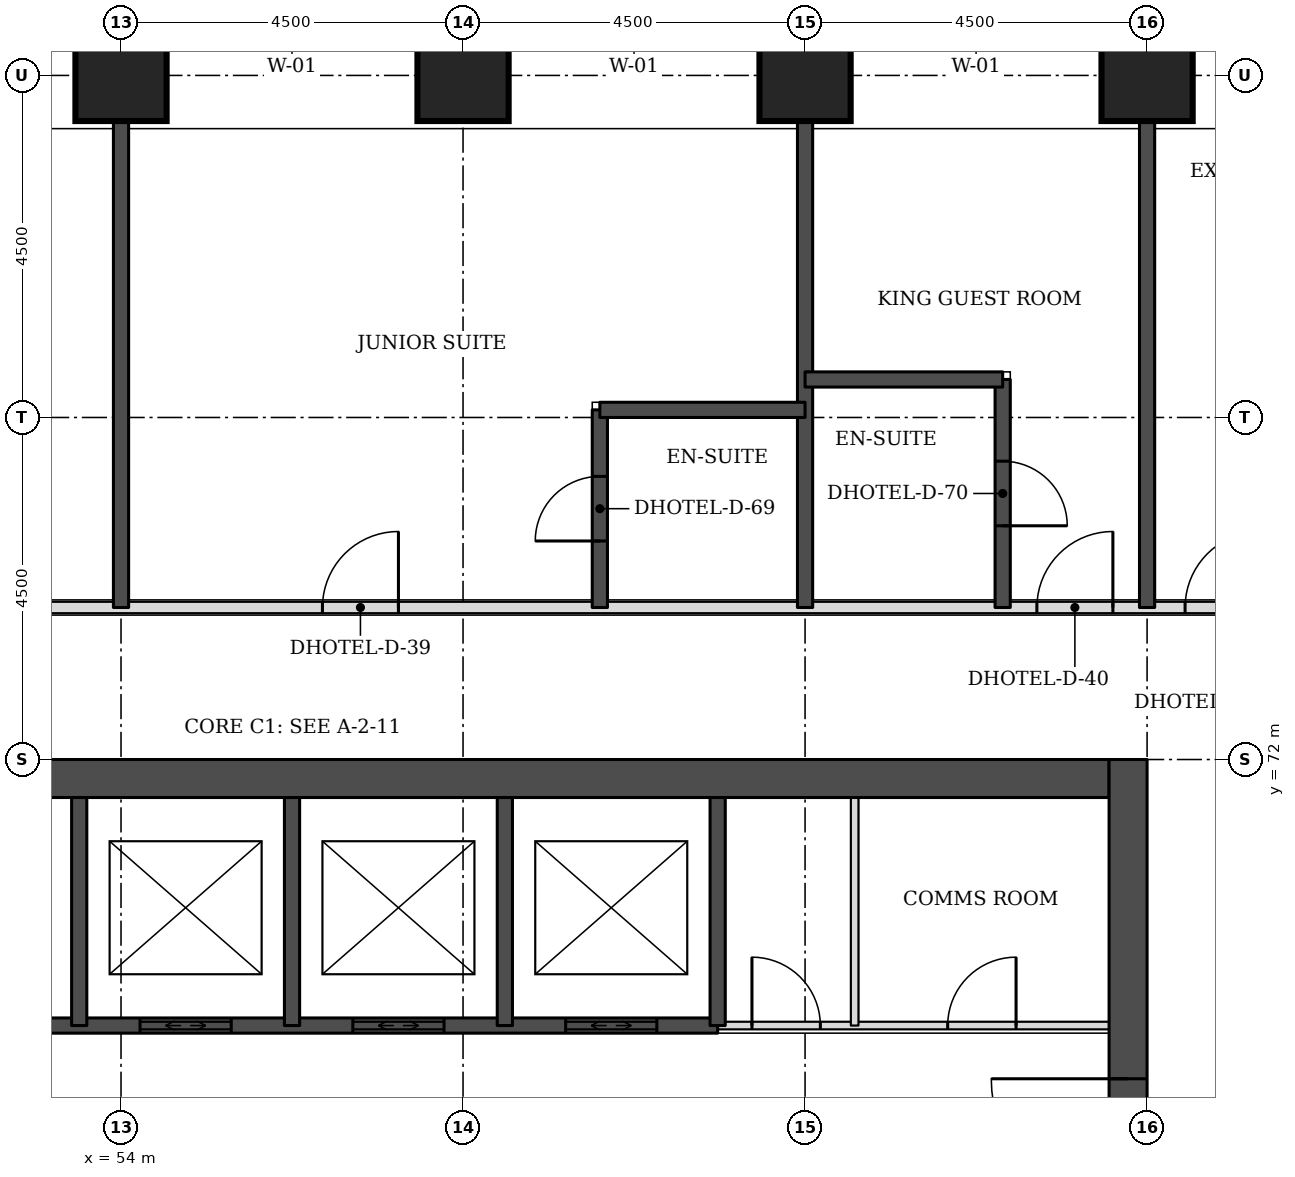
"""IFC4 building model, lengths in metres.
Left out: names, types, materials, properties, quantities, classifications, styles, units other than length and angle.
Written with IfcOpenShell. Run it as: python <this file> out.ifc"""

import sys

from ifc_helpers import new_model, si_unit, direction, frame, frame_2d, origin, origin_2d, place, context, subcontext, project, spatial, rectangle, extrude, element, fill, save


model = new_model("IFC4")
c1 = context("Model", 3, precision=1e-05, world=origin(), true_north=direction((0.0, 1.0)))
c2 = subcontext(c1, "Body", "Model", "MODEL_VIEW")
j1 = project(units=[si_unit("LENGTHUNIT", "METRE"), si_unit("PLANEANGLEUNIT", "RADIAN")], contexts=[c1])
p1 = place(None, origin())
s1 = spatial("IfcSite", under=j1, at=p1, CompositionType="ELEMENT")
p2 = place(p1, origin())
s2 = spatial("IfcBuilding", under=s1, at=p2, CompositionType="ELEMENT")
p3 = place(p2, frame((0.0, 0.0, 36.3)))
s3 = spatial("IfcBuildingStorey", under=s2, at=p3, CompositionType="ELEMENT", Elevation=36.3)
for number, where, z_axis, x_axis in (
    (1, (54.0, 81.0, 0.0), (0.0, 0.0, 1.0), (1.0, 0.0, 0.0)),
    (2, (58.5, 81.0, 0.0), (0.0, 0.0, 1.0), (1.0, 0.0, 0.0)),
    (3, (63.0, 81.0, 0.0), (0.0, 0.0, 1.0), (1.0, 0.0, 0.0)),
    (4, (67.5, 81.0, 0.0), (0.0, 0.0, 1.0), (1.0, 0.0, 0.0)),
):
    element("IfcColumn", number, at=place(p3, frame(where, z_axis=z_axis, x_axis=x_axis)), inside=s3, PredefinedType="COLUMN", context=c2, shape_type="SweptSolid", body=[
        extrude(rectangle(XDim=1.2, YDim=1.2, at=origin_2d()), origin(), (0.0, 0.0, 1.0), 3.3),
    ])
p4 = place(p3, frame((45.5, 71.75, 0.0), z_axis=(0.0, 0.0, 1.0), x_axis=(1.0, 0.0, 0.0)))
e5 = element("IfcWall", 5, at=p4, inside=s3, PredefinedType="SHEAR", context=c2, shape_type="SweptSolid", body=[
    extrude(rectangle(XDim=21.5, YDim=0.5, at=frame_2d((10.75, 0.0))), origin(), (0.0, 0.0, 1.0), 3.3),
])
p5 = place(p3, frame((67.25, 49.5, 0.0), z_axis=(0.0, 0.0, 1.0), x_axis=(0.0, 1.0, 0.0)))
e6 = element("IfcWall", 6, at=p5, inside=s3, PredefinedType="SHEAR", context=c2, shape_type="SweptSolid", body=[
    extrude(rectangle(XDim=22.5, YDim=0.5, at=frame_2d((11.25, 0.0))), origin(), (0.0, 0.0, 1.0), 3.3),
])
p6 = place(p5, frame((4.2, 0.0, 0.0)))
e7 = element("IfcOpeningElement", 7, at=p6, cuts=e6, PredefinedType="OPENING", context=c2, shape_type="SweptSolid", body=[
    extrude(rectangle(XDim=1.8, YDim=2.1, at=frame_2d((0.9, 1.05))), frame((0.0, 0.26, 0.0), z_axis=(0.0, -1.0, 0.0), x_axis=(1.0, 0.0, 0.0)), (0.0, 0.0, 1.0), 0.52),
])
p7 = place(p5, frame((6.9, 0.0, 0.0)))
e8 = element("IfcOpeningElement", 8, at=p7, cuts=e6, PredefinedType="OPENING", context=c2, shape_type="SweptSolid", body=[
    extrude(rectangle(XDim=1.1, YDim=2.1, at=frame_2d((0.55, 1.05))), frame((0.0, 0.26, 0.0), z_axis=(0.0, -1.0, 0.0), x_axis=(1.0, 0.0, 0.0)), (0.0, 0.0, 1.0), 0.52),
])
p8 = place(p5, frame((13.6, 0.0, 0.0)))
e9 = element("IfcOpeningElement", 9, at=p8, cuts=e6, PredefinedType="OPENING", context=c2, shape_type="SweptSolid", body=[
    extrude(rectangle(XDim=1.1, YDim=2.1, at=frame_2d((0.55, 1.05))), frame((0.0, 0.26, 0.0), z_axis=(0.0, -1.0, 0.0), x_axis=(1.0, 0.0, 0.0)), (0.0, 0.0, 1.0), 0.52),
])
p9 = place(p5, frame((16.5, 0.0, 0.0)))
e10 = element("IfcOpeningElement", 10, at=p9, cuts=e6, PredefinedType="OPENING", context=c2, shape_type="SweptSolid", body=[
    extrude(rectangle(XDim=1.8, YDim=2.1, at=frame_2d((0.9, 1.05))), frame((0.0, 0.26, 0.0), z_axis=(0.0, -1.0, 0.0), x_axis=(1.0, 0.0, 0.0)), (0.0, 0.0, 1.0), 0.52),
])
p10 = place(p3, frame((43.0, 74.0, 0.0), z_axis=(0.0, 0.0, 1.0), x_axis=(1.0, 0.0, 0.0)))
e11 = element("IfcWall", 11, at=p10, inside=s3, PredefinedType="PARTITIONING", context=c2, shape_type="SweptSolid", body=[
    extrude(rectangle(XDim=26.5, YDim=0.15, at=frame_2d((13.25, 0.0))), origin(), (0.0, 0.0, 1.0), 3.08),
])
p11 = place(p10, frame((7.6, 0.0, 0.0)))
e12 = element("IfcOpeningElement", 12, at=p11, cuts=e11, PredefinedType="OPENING", context=c2, shape_type="SweptSolid", body=[
    extrude(rectangle(XDim=1.0, YDim=2.1, at=frame_2d((0.5, 1.05))), frame((0.0, 0.085, 0.0), z_axis=(0.0, -1.0, 0.0), x_axis=(1.0, 0.0, 0.0)), (0.0, 0.0, 1.0), 0.17),
])
p12 = place(p10, frame((13.65, 0.0, 0.0)))
e13 = element("IfcOpeningElement", 13, at=p12, cuts=e11, PredefinedType="OPENING", context=c2, shape_type="SweptSolid", body=[
    extrude(rectangle(XDim=1.0, YDim=2.1, at=frame_2d((0.5, 1.05))), frame((0.0, 0.085, 0.0), z_axis=(0.0, -1.0, 0.0), x_axis=(1.0, 0.0, 0.0)), (0.0, 0.0, 1.0), 0.17),
])
p13 = place(p10, frame((23.05, 0.0, 0.0)))
e14 = element("IfcOpeningElement", 14, at=p13, cuts=e11, PredefinedType="OPENING", context=c2, shape_type="SweptSolid", body=[
    extrude(rectangle(XDim=1.0, YDim=2.1, at=frame_2d((0.5, 1.05))), frame((0.0, 0.085, 0.0), z_axis=(0.0, -1.0, 0.0), x_axis=(1.0, 0.0, 0.0)), (0.0, 0.0, 1.0), 0.17),
])
p14 = place(p10, frame((0.5, 0.0, 0.0)))
e15 = element("IfcOpeningElement", 15, at=p14, cuts=e11, PredefinedType="OPENING", context=c2, shape_type="SweptSolid", body=[
    extrude(rectangle(XDim=1.0, YDim=2.1, at=frame_2d((0.5, 1.05))), frame((0.0, 0.085, 0.0), z_axis=(0.0, -1.0, 0.0), x_axis=(1.0, 0.0, 0.0)), (0.0, 0.0, 1.0), 0.17),
])
p15 = place(p10, frame((25.0, 0.0, 0.0)))
e16 = element("IfcOpeningElement", 16, at=p15, cuts=e11, PredefinedType="OPENING", context=c2, shape_type="SweptSolid", body=[
    extrude(rectangle(XDim=1.0, YDim=2.1, at=frame_2d((0.5, 1.05))), frame((0.0, 0.085, 0.0), z_axis=(0.0, -1.0, 0.0), x_axis=(1.0, 0.0, 0.0)), (0.0, 0.0, 1.0), 0.17),
])
p16 = place(p3, frame((54.0, 74.0, 0.0), z_axis=(0.0, 0.0, 1.0), x_axis=(0.0, 1.0, 0.0)))
e17 = element("IfcWall", 17, at=p16, inside=s3, PredefinedType="SOLIDWALL", context=c2, shape_type="SweptSolid", body=[
    extrude(rectangle(XDim=6.4, YDim=0.2, at=frame_2d((3.2, 0.0))), origin(), (0.0, 0.0, 1.0), 3.08),
])
p17 = place(p3, frame((60.3, 74.0, 0.0), z_axis=(0.0, 0.0, 1.0), x_axis=(0.0, 1.0, 0.0)))
e18 = element("IfcWall", 18, at=p17, inside=s3, PredefinedType="SOLIDWALL", context=c2, shape_type="SweptSolid", body=[
    extrude(rectangle(XDim=2.6, YDim=0.2, at=frame_2d((1.3, 0.0))), origin(), (0.0, 0.0, 1.0), 3.08),
])
p18 = place(p17, frame((0.875, 0.0, 0.0)))
e19 = element("IfcOpeningElement", 19, at=p18, cuts=e18, PredefinedType="OPENING", context=c2, shape_type="SweptSolid", body=[
    extrude(rectangle(XDim=0.85, YDim=2.1, at=frame_2d((0.425, 1.05))), frame((0.0, 0.11, 0.0), z_axis=(0.0, -1.0, 0.0), x_axis=(1.0, 0.0, 0.0)), (0.0, 0.0, 1.0), 0.22),
])
p19 = place(p3, frame((63.0, 74.0, 0.0), z_axis=(0.0, 0.0, 1.0), x_axis=(0.0, 1.0, 0.0)))
e20 = element("IfcWall", 20, at=p19, inside=s3, PredefinedType="SOLIDWALL", context=c2, shape_type="SweptSolid", body=[
    extrude(rectangle(XDim=6.4, YDim=0.2, at=frame_2d((3.2, 0.0))), origin(), (0.0, 0.0, 1.0), 3.08),
])
p20 = place(p3, frame((65.6, 74.0, 0.0), z_axis=(0.0, 0.0, 1.0), x_axis=(0.0, 1.0, 0.0)))
e21 = element("IfcWall", 21, at=p20, inside=s3, PredefinedType="SOLIDWALL", context=c2, shape_type="SweptSolid", body=[
    extrude(rectangle(XDim=3.0, YDim=0.2, at=frame_2d((1.5, 0.0))), origin(), (0.0, 0.0, 1.0), 3.08),
])
p21 = place(p20, frame((1.075, 0.0, 0.0)))
e22 = element("IfcOpeningElement", 22, at=p21, cuts=e21, PredefinedType="OPENING", context=c2, shape_type="SweptSolid", body=[
    extrude(rectangle(XDim=0.85, YDim=2.1, at=frame_2d((0.425, 1.05))), frame((0.0, 0.11, 0.0), z_axis=(0.0, -1.0, 0.0), x_axis=(1.0, 0.0, 0.0)), (0.0, 0.0, 1.0), 0.22),
])
p22 = place(p3, frame((67.5, 74.0, 0.0), z_axis=(0.0, 0.0, 1.0), x_axis=(0.0, 1.0, 0.0)))
e23 = element("IfcWall", 23, at=p22, inside=s3, PredefinedType="SOLIDWALL", context=c2, shape_type="SweptSolid", body=[
    extrude(rectangle(XDim=6.4, YDim=0.2, at=frame_2d((3.2, 0.0))), origin(), (0.0, 0.0, 1.0), 3.08),
])
p23 = place(p3, frame((60.3, 76.6, 0.0), z_axis=(0.0, 0.0, 1.0), x_axis=(1.0, 0.0, 0.0)))
e24 = element("IfcWall", 24, at=p23, inside=s3, PredefinedType="SOLIDWALL", context=c2, shape_type="SweptSolid", body=[
    extrude(rectangle(XDim=2.7, YDim=0.2, at=frame_2d((1.35, 0.0))), origin(), (0.0, 0.0, 1.0), 3.08),
])
p24 = place(p3, frame((63.0, 77.0, 0.0), z_axis=(0.0, 0.0, 1.0), x_axis=(1.0, 0.0, 0.0)))
e25 = element("IfcWall", 25, at=p24, inside=s3, PredefinedType="SOLIDWALL", context=c2, shape_type="SweptSolid", body=[
    extrude(rectangle(XDim=2.6, YDim=0.2, at=frame_2d((1.3, 0.0))), origin(), (0.0, 0.0, 1.0), 3.08),
])
p25 = place(p3, frame((61.85, 68.5, 0.0), z_axis=(0.0, 0.0, 1.0), x_axis=(1.0, 0.0, 0.0)))
e26 = element("IfcWall", 26, at=p25, inside=s3, PredefinedType="PARTITIONING", context=c2, shape_type="SweptSolid", body=[
    extrude(rectangle(XDim=5.15, YDim=0.1, at=frame_2d((2.575, 0.0))), origin(), (0.0, 0.0, 1.0), 3.08),
])
p26 = place(p25, frame((3.026, 0.0, 0.0)))
e27 = element("IfcOpeningElement", 27, at=p26, cuts=e26, PredefinedType="OPENING", context=c2, shape_type="SweptSolid", body=[
    extrude(rectangle(XDim=0.9, YDim=2.1, at=frame_2d((0.45, 1.05))), frame((0.0, 0.06, 0.0), z_axis=(0.0, -1.0, 0.0), x_axis=(1.0, 0.0, 0.0)), (0.0, 0.0, 1.0), 0.12),
])
p27 = place(p25, frame((0.451, 0.0, 0.0)))
e28 = element("IfcOpeningElement", 28, at=p27, cuts=e26, PredefinedType="OPENING", context=c2, shape_type="SweptSolid", body=[
    extrude(rectangle(XDim=0.9, YDim=2.1, at=frame_2d((0.45, 1.05))), frame((0.0, 0.06, 0.0), z_axis=(0.0, -1.0, 0.0), x_axis=(1.0, 0.0, 0.0)), (0.0, 0.0, 1.0), 0.12),
])
p28 = place(p3, frame((50.65, 68.5, 0.0), z_axis=(0.0, 0.0, 1.0), x_axis=(1.0, 0.0, 0.0)))
e29 = element("IfcWall", 29, at=p28, inside=s3, PredefinedType="SOLIDWALL", context=c2, shape_type="SweptSolid", body=[
    extrude(rectangle(XDim=11.2, YDim=0.2, at=frame_2d((5.6, 0.0))), origin(), (0.0, 0.0, 1.0), 3.08),
])
p29 = place(p28, frame((0.8, 0.0, 0.0)))
e30 = element("IfcOpeningElement", 30, at=p29, cuts=e29, PredefinedType="OPENING", context=c2, shape_type="SweptSolid", body=[
    extrude(rectangle(XDim=1.2, YDim=2.1, at=frame_2d((0.6, 1.05))), frame((0.0, 0.11, 0.0), z_axis=(0.0, -1.0, 0.0), x_axis=(1.0, 0.0, 0.0)), (0.0, 0.0, 1.0), 0.22),
])
p30 = place(p28, frame((3.6, 0.0, 0.0)))
e31 = element("IfcOpeningElement", 31, at=p30, cuts=e29, PredefinedType="OPENING", context=c2, shape_type="SweptSolid", body=[
    extrude(rectangle(XDim=1.2, YDim=2.1, at=frame_2d((0.6, 1.05))), frame((0.0, 0.11, 0.0), z_axis=(0.0, -1.0, 0.0), x_axis=(1.0, 0.0, 0.0)), (0.0, 0.0, 1.0), 0.22),
])
p31 = place(p28, frame((6.4, 0.0, 0.0)))
e32 = element("IfcOpeningElement", 32, at=p31, cuts=e29, PredefinedType="OPENING", context=c2, shape_type="SweptSolid", body=[
    extrude(rectangle(XDim=1.2, YDim=2.1, at=frame_2d((0.6, 1.05))), frame((0.0, 0.11, 0.0), z_axis=(0.0, -1.0, 0.0), x_axis=(1.0, 0.0, 0.0)), (0.0, 0.0, 1.0), 0.22),
])
p32 = place(p28, frame((9.2, 0.0, 0.0)))
e33 = element("IfcOpeningElement", 33, at=p32, cuts=e29, PredefinedType="OPENING", context=c2, shape_type="SweptSolid", body=[
    extrude(rectangle(XDim=1.2, YDim=2.1, at=frame_2d((0.6, 1.05))), frame((0.0, 0.11, 0.0), z_axis=(0.0, -1.0, 0.0), x_axis=(1.0, 0.0, 0.0)), (0.0, 0.0, 1.0), 0.22),
])
for number, where, z_axis, x_axis in (
    (34, (53.45, 68.5, 0.0), (0.0, 0.0, 1.0), (0.0, 1.0, 0.0)),
    (35, (56.25, 68.5, 0.0), (0.0, 0.0, 1.0), (0.0, 1.0, 0.0)),
    (36, (59.05, 68.5, 0.0), (0.0, 0.0, 1.0), (0.0, 1.0, 0.0)),
    (37, (61.85, 68.5, 0.0), (0.0, 0.0, 1.0), (0.0, 1.0, 0.0)),
):
    element("IfcWall", number, at=place(p3, frame(where, z_axis=z_axis, x_axis=x_axis)), inside=s3, PredefinedType="SOLIDWALL", context=c2, shape_type="SweptSolid", body=[
        extrude(rectangle(XDim=3.0, YDim=0.2, at=frame_2d((1.5, 0.0))), origin(), (0.0, 0.0, 1.0), 3.08),
    ])
p33 = place(p3, frame((63.653, 68.5, 0.0), z_axis=(0.0, 0.0, 1.0), x_axis=(0.0, 1.0, 0.0)))
e38 = element("IfcWall", 38, at=p33, inside=s3, PredefinedType="PARTITIONING", context=c2, shape_type="SweptSolid", body=[
    extrude(rectangle(XDim=3.0, YDim=0.1, at=frame_2d((1.5, 0.0))), origin(), (0.0, 0.0, 1.0), 3.08),
])
p34 = place(p12, origin())
e39 = element("IfcDoor", 39, at=p34, inside=s3, OperationType="SINGLE_SWING_RIGHT", PredefinedType="DOOR", context=c2, shape_type="SweptSolid", body=[
    extrude(rectangle(XDim=1.0, YDim=2.1, at=frame_2d((0.5, 1.05))), frame((0.0, 0.025, 0.0), z_axis=(0.0, -1.0, 0.0), x_axis=(1.0, 0.0, 0.0)), (0.0, 0.0, 1.0), 0.05),
])
fill(e13, e39)
p35 = place(p18, origin())
e40 = element("IfcDoor", 40, at=p35, inside=s3, OperationType="SINGLE_SWING_LEFT", PredefinedType="DOOR", context=c2, shape_type="SweptSolid", body=[
    extrude(rectangle(XDim=0.85, YDim=2.1, at=frame_2d((0.425, 1.05))), frame((0.0, 0.025, 0.0), z_axis=(0.0, -1.0, 0.0), x_axis=(1.0, 0.0, 0.0)), (0.0, 0.0, 1.0), 0.05),
])
fill(e19, e40)
p36 = place(p13, origin())
e41 = element("IfcDoor", 41, at=p36, inside=s3, OperationType="SINGLE_SWING_RIGHT", PredefinedType="DOOR", context=c2, shape_type="SweptSolid", body=[
    extrude(rectangle(XDim=1.0, YDim=2.1, at=frame_2d((0.5, 1.05))), frame((0.0, 0.025, 0.0), z_axis=(0.0, -1.0, 0.0), x_axis=(1.0, 0.0, 0.0)), (0.0, 0.0, 1.0), 0.05),
])
fill(e14, e41)
p37 = place(p21, frame((0.85, 0.0, 0.0), z_axis=(0.0, 0.0, 1.0), x_axis=(-1.0, 0.0, 0.0)))
e42 = element("IfcDoor", 42, at=p37, inside=s3, OperationType="SINGLE_SWING_RIGHT", PredefinedType="DOOR", context=c2, shape_type="SweptSolid", body=[
    extrude(rectangle(XDim=0.85, YDim=2.1, at=frame_2d((0.425, 1.05))), frame((0.0, 0.025, 0.0), z_axis=(0.0, -1.0, 0.0), x_axis=(1.0, 0.0, 0.0)), (0.0, 0.0, 1.0), 0.05),
])
fill(e22, e42)
p38 = place(p15, origin())
e43 = element("IfcDoor", 43, at=p38, inside=s3, OperationType="SINGLE_SWING_RIGHT", PredefinedType="DOOR", context=c2, shape_type="SweptSolid", body=[
    extrude(rectangle(XDim=1.0, YDim=2.1, at=frame_2d((0.5, 1.05))), frame((0.0, 0.025, 0.0), z_axis=(0.0, -1.0, 0.0), x_axis=(1.0, 0.0, 0.0)), (0.0, 0.0, 1.0), 0.05),
])
fill(e16, e43)
p39 = place(p30, origin())
e44 = element("IfcDoor", 44, at=p39, inside=s3, OperationType="DOUBLE_DOOR_SLIDING", PredefinedType="DOOR", context=c2, shape_type="SweptSolid", body=[
    extrude(rectangle(XDim=1.2, YDim=2.1, at=frame_2d((0.6, 1.05))), frame((0.0, 0.025, 0.0), z_axis=(0.0, -1.0, 0.0), x_axis=(1.0, 0.0, 0.0)), (0.0, 0.0, 1.0), 0.05),
])
fill(e31, e44)
p40 = place(p31, origin())
e45 = element("IfcDoor", 45, at=p40, inside=s3, OperationType="DOUBLE_DOOR_SLIDING", PredefinedType="DOOR", context=c2, shape_type="SweptSolid", body=[
    extrude(rectangle(XDim=1.2, YDim=2.1, at=frame_2d((0.6, 1.05))), frame((0.0, 0.025, 0.0), z_axis=(0.0, -1.0, 0.0), x_axis=(1.0, 0.0, 0.0)), (0.0, 0.0, 1.0), 0.05),
])
fill(e32, e45)
p41 = place(p32, origin())
e46 = element("IfcDoor", 46, at=p41, inside=s3, OperationType="DOUBLE_DOOR_SLIDING", PredefinedType="DOOR", context=c2, shape_type="SweptSolid", body=[
    extrude(rectangle(XDim=1.2, YDim=2.1, at=frame_2d((0.6, 1.05))), frame((0.0, 0.025, 0.0), z_axis=(0.0, -1.0, 0.0), x_axis=(1.0, 0.0, 0.0)), (0.0, 0.0, 1.0), 0.05),
])
fill(e33, e46)
p42 = place(p9, origin())
e47 = element("IfcDoor", 47, at=p42, inside=s3, OperationType="SINGLE_SWING_RIGHT", PredefinedType="DOOR", context=c2, shape_type="SweptSolid", body=[
    extrude(rectangle(XDim=1.8, YDim=2.1, at=frame_2d((0.9, 1.05))), frame((0.0, 0.025, 0.0), z_axis=(0.0, -1.0, 0.0), x_axis=(1.0, 0.0, 0.0)), (0.0, 0.0, 1.0), 0.05),
])
fill(e10, e47)
p43 = place(p26, origin())
e48 = element("IfcDoor", 48, at=p43, inside=s3, OperationType="SINGLE_SWING_RIGHT", PredefinedType="DOOR", context=c2, shape_type="SweptSolid", body=[
    extrude(rectangle(XDim=0.9, YDim=2.1, at=frame_2d((0.45, 1.05))), frame((0.0, 0.025, 0.0), z_axis=(0.0, -1.0, 0.0), x_axis=(1.0, 0.0, 0.0)), (0.0, 0.0, 1.0), 0.05),
])
fill(e27, e48)
p44 = place(p27, origin())
e49 = element("IfcDoor", 49, at=p44, inside=s3, OperationType="SINGLE_SWING_LEFT", PredefinedType="DOOR", context=c2, shape_type="SweptSolid", body=[
    extrude(rectangle(XDim=0.9, YDim=2.1, at=frame_2d((0.45, 1.05))), frame((0.0, 0.025, 0.0), z_axis=(0.0, -1.0, 0.0), x_axis=(1.0, 0.0, 0.0)), (0.0, 0.0, 1.0), 0.05),
])
fill(e28, e49)
save(model, sys.argv[1])
